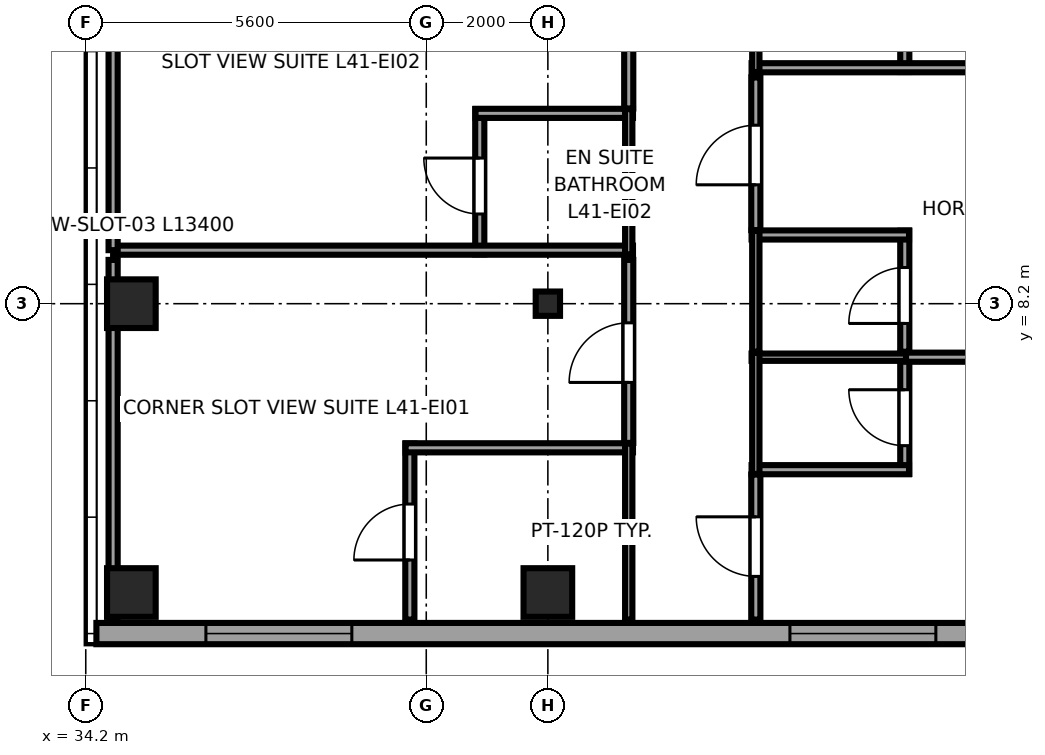
"""IFC4 building model, lengths in metres.
Left out: names, types, materials, properties, quantities, classifications, styles, units other than length and angle.
Written with IfcOpenShell. Run it as: python <this file> out.ifc"""

import sys

from ifc_helpers import new_model, si_unit, direction, frame, frame_2d, origin, origin_2d, place, context, subcontext, project, spatial, rectangle, i_section, extrude, source, transform, mapped, element, fill, save


model = new_model("IFC4")
c1 = context("Model", 3, precision=1e-05, world=origin(), true_north=direction((0.0, 1.0)))
c2 = subcontext(c1, "Body", "Model", "MODEL_VIEW")
j1 = project(units=[si_unit("LENGTHUNIT", "METRE"), si_unit("PLANEANGLEUNIT", "RADIAN")], contexts=[c1])
p1 = place(None, origin())
s1 = spatial("IfcSite", under=j1, at=p1, CompositionType="ELEMENT")
p2 = place(p1, origin())
s2 = spatial("IfcBuilding", under=s1, at=p2, CompositionType="ELEMENT")
p3 = place(p2, frame((0.0, 0.0, 157.7)))
s3 = spatial("IfcBuildingStorey", under=s2, at=p3, CompositionType="ELEMENT", Elevation=157.7)
m1 = source(origin(), c2, "Body", "SweptSolid", [
    extrude(rectangle(XDim=0.8, YDim=0.8, at=origin_2d()), origin(), (0.0, 0.0, 1.0), 3.55),
])
for number, where, z_axis, x_axis in (
    (1, (34.95, 3.45, 0.0), (0.0, 0.0, 1.0), (1.0, 0.0, 0.0)),
    (2, (34.95, 8.2, 0.0), (0.0, 0.0, 1.0), (1.0, 0.0, 0.0)),
    (3, (41.8, 3.45, 0.0), (0.0, 0.0, 1.0), (1.0, 0.0, 0.0)),
):
    element("IfcColumn", number, at=place(p3, frame(where, z_axis=z_axis, x_axis=x_axis)), inside=s3, PredefinedType="COLUMN", context=c2, shape_type="MappedRepresentation", body=[
        mapped(m1, transform((0.0, 0.0, 0.0), x_axis=(1.0, 0.0, 0.0), y_axis=(0.0, 1.0, 0.0), z_axis=(0.0, 0.0, 1.0), scale=1.0)),
    ])
m2 = source(origin(), c2, "Body", "SweptSolid", [
    extrude(i_section(OverallWidth=0.4, OverallDepth=0.4, WebThickness=0.02, FlangeThickness=0.035, at=origin_2d()), origin(), (0.0, 0.0, 1.0), 3.55),
])
p4 = place(p3, frame((41.8, 8.2, 0.0), z_axis=(0.0, 0.0, 1.0), x_axis=(1.0, 0.0, 0.0)))
e4 = element("IfcColumn", 4, at=p4, inside=s3, PredefinedType="COLUMN", context=c2, shape_type="MappedRepresentation", body=[
    mapped(m2, transform((0.0, 0.0, 0.0), x_axis=(1.0, 0.0, 0.0), y_axis=(0.0, 1.0, 0.0), z_axis=(0.0, 0.0, 1.0), scale=1.0)),
])
p5 = place(p3, frame((34.375, 2.775, 0.0), z_axis=(0.0, 0.0, 1.0), x_axis=(1.0, 0.0, 0.0)))
e5 = element("IfcWall", 5, at=p5, inside=s3, PredefinedType="SOLIDWALL", context=c2, shape_type="SweptSolid", body=[
    extrude(rectangle(XDim=15.608, YDim=0.35, at=frame_2d((7.804, 0.0))), origin(), (0.0, 0.0, 1.0), 3.37),
])
p6 = place(p5, frame((1.801, 0.0, 0.68)))
e6 = element("IfcOpeningElement", 6, at=p6, cuts=e5, PredefinedType="OPENING", context=c2, shape_type="SweptSolid", body=[
    extrude(rectangle(XDim=2.4, YDim=1.9, at=frame_2d((1.2, 0.95))), frame((0.0, 0.185, 0.0), z_axis=(0.0, -1.0, 0.0), x_axis=(1.0, 0.0, 0.0)), (0.0, 0.0, 1.0), 0.37),
])
p7 = place(p5, frame((11.406, 0.0, 0.68)))
e7 = element("IfcOpeningElement", 7, at=p7, cuts=e5, PredefinedType="OPENING", context=c2, shape_type="SweptSolid", body=[
    extrude(rectangle(XDim=2.4, YDim=1.9, at=frame_2d((1.2, 0.95))), frame((0.0, 0.185, 0.0), z_axis=(0.0, -1.0, 0.0), x_axis=(1.0, 0.0, 0.0)), (0.0, 0.0, 1.0), 0.37),
])
p8 = place(p3, frame((39.53, 3.005, 0.0), z_axis=(0.0, 0.0, 1.0), x_axis=(0.0, 1.0, 0.0)))
e8 = element("IfcWall", 8, at=p8, inside=s3, PredefinedType="PARTITIONING", context=c2, shape_type="SweptSolid", body=[
    extrude(rectangle(XDim=2.895, YDim=0.15, at=frame_2d((1.448, 0.0))), origin(), (0.0, 0.0, 1.0), 3.37),
])
p9 = place(p8, frame((0.98, 0.0, 0.0)))
e9 = element("IfcOpeningElement", 9, at=p9, cuts=e8, PredefinedType="OPENING", context=c2, shape_type="SweptSolid", body=[
    extrude(rectangle(XDim=0.92, YDim=2.01, at=frame_2d((0.46, 1.005))), frame((0.0, 0.085, 0.0), z_axis=(0.0, -1.0, 0.0), x_axis=(1.0, 0.0, 0.0)), (0.0, 0.0, 1.0), 0.17),
])
p10 = place(p3, frame((39.46, 5.83, 0.0), z_axis=(0.0, 0.0, 1.0), x_axis=(1.0, 0.0, 0.0)))
e10 = element("IfcWall", 10, at=p10, inside=s3, PredefinedType="PARTITIONING", context=c2, shape_type="SweptSolid", body=[
    extrude(rectangle(XDim=3.74, YDim=0.15, at=frame_2d((1.87, 0.0))), origin(), (0.0, 0.0, 1.0), 3.37),
])
p11 = place(p3, frame((43.13, 3.005, 0.0), z_axis=(0.0, 0.0, 1.0), x_axis=(0.0, 1.0, 0.0)))
e11 = element("IfcWall", 11, at=p11, inside=s3, PredefinedType="PLUMBINGWALL", context=c2, shape_type="SweptSolid", body=[
    extrude(rectangle(XDim=2.895, YDim=0.12, at=frame_2d((1.448, 0.0))), origin(), (0.0, 0.0, 1.0), 3.37),
])
p12 = place(p3, frame((40.68, 9.01, 0.0), z_axis=(0.0, 0.0, 1.0), x_axis=(0.0, 1.0, 0.0)))
e12 = element("IfcWall", 12, at=p12, inside=s3, PredefinedType="PARTITIONING", context=c2, shape_type="SweptSolid", body=[
    extrude(rectangle(XDim=2.39, YDim=0.15, at=frame_2d((1.195, 0.0))), origin(), (0.0, 0.0, 1.0), 3.37),
])
p13 = place(p12, frame((0.665, 0.0, 0.0)))
e13 = element("IfcOpeningElement", 13, at=p13, cuts=e12, PredefinedType="OPENING", context=c2, shape_type="SweptSolid", body=[
    extrude(rectangle(XDim=0.92, YDim=2.01, at=frame_2d((0.46, 1.005))), frame((0.0, 0.085, 0.0), z_axis=(0.0, -1.0, 0.0), x_axis=(1.0, 0.0, 0.0)), (0.0, 0.0, 1.0), 0.17),
])
p14 = place(p3, frame((34.65, 9.08, 0.0), z_axis=(0.0, 0.0, 1.0), x_axis=(1.0, 0.0, 0.0)))
e14 = element("IfcWall", 14, at=p14, inside=s3, PredefinedType="PARTITIONING", context=c2, shape_type="SweptSolid", body=[
    extrude(rectangle(XDim=8.55, YDim=0.15, at=frame_2d((4.275, 0.0))), origin(), (0.0, 0.0, 1.0), 3.37),
])
p15 = place(p3, frame((40.61, 11.33, 0.0), z_axis=(0.0, 0.0, 1.0), x_axis=(1.0, 0.0, 0.0)))
e15 = element("IfcWall", 15, at=p15, inside=s3, PredefinedType="PARTITIONING", context=c2, shape_type="SweptSolid", body=[
    extrude(rectangle(XDim=2.59, YDim=0.15, at=frame_2d((1.295, 0.0))), origin(), (0.0, 0.0, 1.0), 3.37),
])
p16 = place(p3, frame((43.13, 9.01, 0.0), z_axis=(0.0, 0.0, 1.0), x_axis=(0.0, 1.0, 0.0)))
e16 = element("IfcWall", 16, at=p16, inside=s3, PredefinedType="PLUMBINGWALL", context=c2, shape_type="SweptSolid", body=[
    extrude(rectangle(XDim=2.39, YDim=0.12, at=frame_2d((1.195, 0.0))), origin(), (0.0, 0.0, 1.0), 3.37),
])
p17 = place(p3, frame((47.67, 5.4, 0.0), z_axis=(0.0, 0.0, 1.0), x_axis=(0.0, 1.0, 0.0)))
e17 = element("IfcWall", 17, at=p17, inside=s3, PredefinedType="PARTITIONING", context=c2, shape_type="SweptSolid", body=[
    extrude(rectangle(XDim=1.99, YDim=0.15, at=frame_2d((0.995, 0.0))), origin(), (0.0, 0.0, 1.0), 3.37),
])
p18 = place(p17, frame((0.465, 0.0, 0.0)))
e18 = element("IfcOpeningElement", 18, at=p18, cuts=e17, PredefinedType="OPENING", context=c2, shape_type="SweptSolid", body=[
    extrude(rectangle(XDim=0.92, YDim=2.01, at=frame_2d((0.46, 1.005))), frame((0.0, 0.085, 0.0), z_axis=(0.0, -1.0, 0.0), x_axis=(1.0, 0.0, 0.0)), (0.0, 0.0, 1.0), 0.17),
])
p19 = place(p3, frame((45.15, 5.47, 0.0), z_axis=(0.0, 0.0, 1.0), x_axis=(1.0, 0.0, 0.0)))
e19 = element("IfcWall", 19, at=p19, inside=s3, PredefinedType="PARTITIONING", context=c2, shape_type="SweptSolid", body=[
    extrude(rectangle(XDim=2.59, YDim=0.15, at=frame_2d((1.295, 0.0))), origin(), (0.0, 0.0, 1.0), 3.37),
])
p20 = place(p3, frame((45.15, 7.32, 0.0), z_axis=(0.0, 0.0, 1.0), x_axis=(1.0, 0.0, 0.0)))
e20 = element("IfcWall", 20, at=p20, inside=s3, PredefinedType="PLUMBINGWALL", context=c2, shape_type="SweptSolid", body=[
    extrude(rectangle(XDim=2.59, YDim=0.12, at=frame_2d((1.295, 0.0))), origin(), (0.0, 0.0, 1.0), 3.37),
])
p21 = place(p3, frame((45.22, 5.4, 0.0), z_axis=(0.0, 0.0, 1.0), x_axis=(0.0, 1.0, 0.0)))
e21 = element("IfcWall", 21, at=p21, inside=s3, PredefinedType="PLUMBINGWALL", context=c2, shape_type="SweptSolid", body=[
    extrude(rectangle(XDim=1.99, YDim=0.12, at=frame_2d((0.995, 0.0))), origin(), (0.0, 0.0, 1.0), 3.37),
])
p22 = place(p3, frame((47.67, 7.41, 0.0), z_axis=(0.0, 0.0, 1.0), x_axis=(0.0, 1.0, 0.0)))
e22 = element("IfcWall", 22, at=p22, inside=s3, PredefinedType="PARTITIONING", context=c2, shape_type="SweptSolid", body=[
    extrude(rectangle(XDim=1.99, YDim=0.15, at=frame_2d((0.995, 0.0))), origin(), (0.0, 0.0, 1.0), 3.37),
])
p23 = place(p22, frame((0.465, 0.0, 0.0)))
e23 = element("IfcOpeningElement", 23, at=p23, cuts=e22, PredefinedType="OPENING", context=c2, shape_type="SweptSolid", body=[
    extrude(rectangle(XDim=0.92, YDim=2.01, at=frame_2d((0.46, 1.005))), frame((0.0, 0.085, 0.0), z_axis=(0.0, -1.0, 0.0), x_axis=(1.0, 0.0, 0.0)), (0.0, 0.0, 1.0), 0.17),
])
p24 = place(p3, frame((45.15, 9.33, 0.0), z_axis=(0.0, 0.0, 1.0), x_axis=(1.0, 0.0, 0.0)))
e24 = element("IfcWall", 24, at=p24, inside=s3, PredefinedType="PARTITIONING", context=c2, shape_type="SweptSolid", body=[
    extrude(rectangle(XDim=2.59, YDim=0.15, at=frame_2d((1.295, 0.0))), origin(), (0.0, 0.0, 1.0), 3.37),
])
p25 = place(p3, frame((45.22, 7.41, 0.0), z_axis=(0.0, 0.0, 1.0), x_axis=(0.0, 1.0, 0.0)))
e25 = element("IfcWall", 25, at=p25, inside=s3, PredefinedType="PLUMBINGWALL", context=c2, shape_type="SweptSolid", body=[
    extrude(rectangle(XDim=1.99, YDim=0.12, at=frame_2d((0.995, 0.0))), origin(), (0.0, 0.0, 1.0), 3.37),
])
p26 = place(p3, frame((47.67, 12.01, 0.0), z_axis=(0.0, 0.0, 1.0), x_axis=(0.0, 1.0, 0.0)))
e26 = element("IfcWall", 26, at=p26, inside=s3, PredefinedType="PARTITIONING", context=c2, shape_type="SweptSolid", body=[
    extrude(rectangle(XDim=1.99, YDim=0.15, at=frame_2d((0.995, 0.0))), origin(), (0.0, 0.0, 1.0), 3.37),
])
p27 = place(p26, frame((0.465, 0.0, 0.0)))
e27 = element("IfcOpeningElement", 27, at=p27, cuts=e26, PredefinedType="OPENING", context=c2, shape_type="SweptSolid", body=[
    extrude(rectangle(XDim=0.92, YDim=2.01, at=frame_2d((0.46, 1.005))), frame((0.0, 0.085, 0.0), z_axis=(0.0, -1.0, 0.0), x_axis=(1.0, 0.0, 0.0)), (0.0, 0.0, 1.0), 0.17),
])
p28 = place(p3, frame((45.15, 12.08, 0.0), z_axis=(0.0, 0.0, 1.0), x_axis=(1.0, 0.0, 0.0)))
e28 = element("IfcWall", 28, at=p28, inside=s3, PredefinedType="PARTITIONING", context=c2, shape_type="SweptSolid", body=[
    extrude(rectangle(XDim=8.845, YDim=0.15, at=frame_2d((4.423, 0.0))), origin(), (0.0, 0.0, 1.0), 3.37),
])
p29 = place(p3, frame((45.22, 12.01, 0.0), z_axis=(0.0, 0.0, 1.0), x_axis=(0.0, 1.0, 0.0)))
e29 = element("IfcWall", 29, at=p29, inside=s3, PredefinedType="PLUMBINGWALL", context=c2, shape_type="SweptSolid", body=[
    extrude(rectangle(XDim=1.99, YDim=0.12, at=frame_2d((0.995, 0.0))), origin(), (0.0, 0.0, 1.0), 3.37),
])
p30 = place(p3, frame((43.13, 5.91, 0.0), z_axis=(0.0, 0.0, 1.0), x_axis=(0.0, 1.0, 0.0)))
e30 = element("IfcWall", 30, at=p30, inside=s3, PredefinedType="PARTITIONING", context=c2, shape_type="SweptSolid", body=[
    extrude(rectangle(XDim=3.01, YDim=0.15, at=frame_2d((1.505, 0.0))), origin(), (0.0, 0.0, 1.0), 3.37),
])
p31 = place(p30, frame((0.995, 0.0, 0.0)))
e31 = element("IfcOpeningElement", 31, at=p31, cuts=e30, PredefinedType="OPENING", context=c2, shape_type="SweptSolid", body=[
    extrude(rectangle(XDim=0.98, YDim=2.12, at=frame_2d((0.49, 1.06))), frame((0.0, 0.085, 0.0), z_axis=(0.0, -1.0, 0.0), x_axis=(1.0, 0.0, 0.0)), (0.0, 0.0, 1.0), 0.17),
])
p32 = place(p3, frame((34.65, 3.005, 0.0), z_axis=(0.0, 0.0, 1.0), x_axis=(0.0, 1.0, 0.0)))
e32 = element("IfcWall", 32, at=p32, inside=s3, PredefinedType="PARTITIONING", context=c2, shape_type="SweptSolid", body=[
    extrude(rectangle(XDim=5.915, YDim=0.15, at=frame_2d((2.958, 0.0))), origin(), (0.0, 0.0, 1.0), 3.37),
])
p33 = place(p3, frame((43.13, 11.41, 0.0), z_axis=(0.0, 0.0, 1.0), x_axis=(0.0, 1.0, 0.0)))
e33 = element("IfcWall", 33, at=p33, inside=s3, PredefinedType="PARTITIONING", context=c2, shape_type="SweptSolid", body=[
    extrude(rectangle(XDim=3.71, YDim=0.15, at=frame_2d((1.855, 0.0))), origin(), (0.0, 0.0, 1.0), 3.37),
])
p34 = place(p33, frame((1.345, 0.0, 0.0)))
e34 = element("IfcOpeningElement", 34, at=p34, cuts=e33, PredefinedType="OPENING", context=c2, shape_type="SweptSolid", body=[
    extrude(rectangle(XDim=0.98, YDim=2.12, at=frame_2d((0.49, 1.06))), frame((0.0, 0.085, 0.0), z_axis=(0.0, -1.0, 0.0), x_axis=(1.0, 0.0, 0.0)), (0.0, 0.0, 1.0), 0.17),
])
p35 = place(p3, frame((34.65, 9.08, 0.0), z_axis=(0.0, 0.0, 1.0), x_axis=(0.0, 1.0, 0.0)))
e35 = element("IfcWall", 35, at=p35, inside=s3, PredefinedType="PARTITIONING", context=c2, shape_type="SweptSolid", body=[
    extrude(rectangle(XDim=6.04, YDim=0.15, at=frame_2d((3.02, 0.0))), origin(), (0.0, 0.0, 1.0), 3.37),
])
p36 = place(p3, frame((45.22, 3.005, 0.0), z_axis=(0.0, 0.0, 1.0), x_axis=(0.0, 1.0, 0.0)))
e36 = element("IfcWall", 36, at=p36, inside=s3, PredefinedType="PARTITIONING", context=c2, shape_type="SweptSolid", body=[
    extrude(rectangle(XDim=2.385, YDim=0.15, at=frame_2d((1.192, 0.0))), origin(), (0.0, 0.0, 1.0), 3.37),
])
p37 = place(p36, frame((0.71, 0.0, 0.0)))
e37 = element("IfcOpeningElement", 37, at=p37, cuts=e36, PredefinedType="OPENING", context=c2, shape_type="SweptSolid", body=[
    extrude(rectangle(XDim=0.98, YDim=2.12, at=frame_2d((0.49, 1.06))), frame((0.0, 0.085, 0.0), z_axis=(0.0, -1.0, 0.0), x_axis=(1.0, 0.0, 0.0)), (0.0, 0.0, 1.0), 0.17),
])
p38 = place(p3, frame((47.69, 7.32, 0.0), z_axis=(0.0, 0.0, 1.0), x_axis=(1.0, 0.0, 0.0)))
e38 = element("IfcWall", 38, at=p38, inside=s3, PredefinedType="PARTITIONING", context=c2, shape_type="SweptSolid", body=[
    extrude(rectangle(XDim=6.305, YDim=0.15, at=frame_2d((3.153, 0.0))), origin(), (0.0, 0.0, 1.0), 3.37),
])
p39 = place(p3, frame((45.22, 9.41, 0.0), z_axis=(0.0, 0.0, 1.0), x_axis=(0.0, 1.0, 0.0)))
e39 = element("IfcWall", 39, at=p39, inside=s3, PredefinedType="PARTITIONING", context=c2, shape_type="SweptSolid", body=[
    extrude(rectangle(XDim=2.51, YDim=0.15, at=frame_2d((1.255, 0.0))), origin(), (0.0, 0.0, 1.0), 3.37),
])
p40 = place(p39, frame((0.745, 0.0, 0.0)))
e40 = element("IfcOpeningElement", 40, at=p40, cuts=e39, PredefinedType="OPENING", context=c2, shape_type="SweptSolid", body=[
    extrude(rectangle(XDim=0.98, YDim=2.12, at=frame_2d((0.49, 1.06))), frame((0.0, 0.085, 0.0), z_axis=(0.0, -1.0, 0.0), x_axis=(1.0, 0.0, 0.0)), (0.0, 0.0, 1.0), 0.17),
])
m3 = source(origin(), c2, "Body", "SweptSolid", [
    extrude(rectangle(XDim=2.4, YDim=1.9, at=frame_2d((1.2, 0.95))), frame((0.0, 0.09, 0.0), z_axis=(0.0, -1.0, 0.0), x_axis=(1.0, 0.0, 0.0)), (0.0, 0.0, 1.0), 0.06),
])
p41 = place(p6, origin())
e41 = element("IfcWindow", 41, at=p41, inside=s3, PartitioningType="TRIPLE_PANEL_HORIZONTAL", PredefinedType="WINDOW", context=c2, shape_type="MappedRepresentation", body=[
    mapped(m3, transform((0.0, 0.0, 0.0), x_axis=(1.0, 0.0, 0.0), y_axis=(0.0, 1.0, 0.0), z_axis=(0.0, 0.0, 1.0), scale=1.0)),
])
fill(e6, e41)
p42 = place(p7, origin())
e42 = element("IfcWindow", 42, at=p42, inside=s3, PartitioningType="TRIPLE_PANEL_HORIZONTAL", PredefinedType="WINDOW", context=c2, shape_type="MappedRepresentation", body=[
    mapped(m3, transform((0.0, 0.0, 0.0), x_axis=(1.0, 0.0, 0.0), y_axis=(0.0, 1.0, 0.0), z_axis=(0.0, 0.0, 1.0), scale=1.0)),
])
fill(e7, e42)
m4 = source(origin(), c2, "Body", "SweptSolid", [
    extrude(rectangle(XDim=0.92, YDim=2.01, at=frame_2d((0.46, 1.005))), frame((0.0, 0.025, 0.0), z_axis=(0.0, -1.0, 0.0), x_axis=(1.0, 0.0, 0.0)), (0.0, 0.0, 1.0), 0.05),
])
p43 = place(p9, origin())
e43 = element("IfcDoor", 43, at=p43, inside=s3, OperationType="SINGLE_SWING_LEFT", PredefinedType="DOOR", context=c2, shape_type="MappedRepresentation", body=[
    mapped(m4, transform((0.0, 0.0, 0.0), x_axis=(1.0, 0.0, 0.0), y_axis=(0.0, 1.0, 0.0), z_axis=(0.0, 0.0, 1.0), scale=1.0)),
])
fill(e9, e43)
p44 = place(p13, origin())
e44 = element("IfcDoor", 44, at=p44, inside=s3, OperationType="SINGLE_SWING_RIGHT", PredefinedType="DOOR", context=c2, shape_type="MappedRepresentation", body=[
    mapped(m4, transform((0.0, 0.0, 0.0), x_axis=(1.0, 0.0, 0.0), y_axis=(0.0, 1.0, 0.0), z_axis=(0.0, 0.0, 1.0), scale=1.0)),
])
fill(e13, e44)
p45 = place(p18, origin())
e45 = element("IfcDoor", 45, at=p45, inside=s3, OperationType="SINGLE_SWING_RIGHT", PredefinedType="DOOR", context=c2, shape_type="MappedRepresentation", body=[
    mapped(m4, transform((0.0, 0.0, 0.0), x_axis=(1.0, 0.0, 0.0), y_axis=(0.0, 1.0, 0.0), z_axis=(0.0, 0.0, 1.0), scale=1.0)),
])
fill(e18, e45)
p46 = place(p23, origin())
e46 = element("IfcDoor", 46, at=p46, inside=s3, OperationType="SINGLE_SWING_LEFT", PredefinedType="DOOR", context=c2, shape_type="MappedRepresentation", body=[
    mapped(m4, transform((0.0, 0.0, 0.0), x_axis=(1.0, 0.0, 0.0), y_axis=(0.0, 1.0, 0.0), z_axis=(0.0, 0.0, 1.0), scale=1.0)),
])
fill(e23, e46)
m5 = source(origin(), c2, "Body", "SweptSolid", [
    extrude(rectangle(XDim=0.98, YDim=2.12, at=frame_2d((0.49, 1.06))), frame((0.0, 0.025, 0.0), z_axis=(0.0, -1.0, 0.0), x_axis=(1.0, 0.0, 0.0)), (0.0, 0.0, 1.0), 0.05),
])
p47 = place(p31, origin())
e47 = element("IfcDoor", 47, at=p47, inside=s3, OperationType="SINGLE_SWING_LEFT", PredefinedType="DOOR", context=c2, shape_type="MappedRepresentation", body=[
    mapped(m5, transform((0.0, 0.0, 0.0), x_axis=(1.0, 0.0, 0.0), y_axis=(0.0, 1.0, 0.0), z_axis=(0.0, 0.0, 1.0), scale=1.0)),
])
fill(e31, e47)
p48 = place(p37, origin())
e48 = element("IfcDoor", 48, at=p48, inside=s3, OperationType="SINGLE_SWING_RIGHT", PredefinedType="DOOR", context=c2, shape_type="MappedRepresentation", body=[
    mapped(m5, transform((0.0, 0.0, 0.0), x_axis=(1.0, 0.0, 0.0), y_axis=(0.0, 1.0, 0.0), z_axis=(0.0, 0.0, 1.0), scale=1.0)),
])
fill(e37, e48)
p49 = place(p40, origin())
e49 = element("IfcDoor", 49, at=p49, inside=s3, OperationType="SINGLE_SWING_LEFT", PredefinedType="DOOR", context=c2, shape_type="MappedRepresentation", body=[
    mapped(m5, transform((0.0, 0.0, 0.0), x_axis=(1.0, 0.0, 0.0), y_axis=(0.0, 1.0, 0.0), z_axis=(0.0, 0.0, 1.0), scale=1.0)),
])
fill(e40, e49)
save(model, sys.argv[1])
